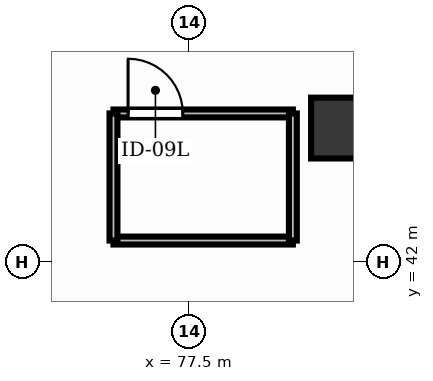
"""IFC4 building model, lengths in metres.
Left out: names, types, materials, properties, quantities, classifications, styles, units other than length and angle.
Written with IfcOpenShell. Run it as: python <this file> out.ifc"""

import sys

from ifc_helpers import new_model, si_unit, direction, frame, frame_2d, origin, origin_2d, place, context, subcontext, project, spatial, rectangle, extrude, element, fill, save


model = new_model("IFC4")
c1 = context("Model", 3, precision=1e-05, world=origin(), true_north=direction((0.0, 1.0)))
c2 = subcontext(c1, "Body", "Model", "MODEL_VIEW")
j1 = project(units=[si_unit("LENGTHUNIT", "METRE"), si_unit("PLANEANGLEUNIT", "RADIAN")], contexts=[c1])
p1 = place(None, origin())
s1 = spatial("IfcSite", under=j1, at=p1, CompositionType="ELEMENT")
p2 = place(p1, origin())
s2 = spatial("IfcBuilding", under=s1, at=p2, CompositionType="ELEMENT")
p3 = place(p2, frame((0.0, 0.0, 15.0)))
s3 = spatial("IfcBuildingStorey", under=s2, at=p3, CompositionType="ELEMENT", Elevation=15.0)
p4 = place(p3, frame((80.0, 44.2, 0.0), z_axis=(0.0, 0.0, 1.0), x_axis=(1.0, 0.0, 0.0)))
e1 = element("IfcColumn", 1, at=p4, inside=s3, PredefinedType="COLUMN", context=c2, shape_type="SweptSolid", body=[
    extrude(rectangle(XDim=1.0, YDim=1.0, at=origin_2d()), origin(), (0.0, 0.0, 1.0), 5.1),
])
p5 = place(p3, frame((76.25, 44.44, 0.0), z_axis=(0.0, 0.0, 1.0), x_axis=(1.0, 0.0, 0.0)))
e2 = element("IfcWall", 2, at=p5, inside=s3, PredefinedType="PARTITIONING", context=c2, shape_type="SweptSolid", body=[
    extrude(rectangle(XDim=2.95, YDim=0.13, at=frame_2d((1.475, 0.0))), origin(), (0.0, 0.0, 1.0), 3.36),
])
p6 = place(p5, frame((0.24, 0.0, 0.0)))
e3 = element("IfcOpeningElement", 3, at=p6, cuts=e2, PredefinedType="OPENING", context=c2, shape_type="SweptSolid", body=[
    extrude(rectangle(XDim=0.9, YDim=2.15, at=frame_2d((0.45, 1.075))), frame((0.0, 0.08, 0.0), z_axis=(0.0, -1.0, 0.0), x_axis=(1.0, 0.0, 0.0)), (0.0, 0.0, 1.0), 0.16),
])
p7 = place(p3, frame((79.2, 42.35, 0.0), z_axis=(0.0, 0.0, 1.0), x_axis=(-1.0, 0.0, 0.0)))
e4 = element("IfcWall", 4, at=p7, inside=s3, PredefinedType="PARTITIONING", context=c2, shape_type="SweptSolid", body=[
    extrude(rectangle(XDim=2.95, YDim=0.13, at=frame_2d((1.475, 0.0))), origin(), (0.0, 0.0, 1.0), 3.36),
])
for number, where, z_axis, x_axis in (
    (5, (76.25, 42.35, 0.0), (0.0, 0.0, 1.0), (0.0, 1.0, 0.0)),
    (6, (79.2, 44.44, 0.0), (0.0, 0.0, 1.0), (0.0, -1.0, 0.0)),
):
    element("IfcWall", number, at=place(p3, frame(where, z_axis=z_axis, x_axis=x_axis)), inside=s3, PredefinedType="PARTITIONING", context=c2, shape_type="SweptSolid", body=[
        extrude(rectangle(XDim=2.09, YDim=0.13, at=frame_2d((1.045, 0.0))), origin(), (0.0, 0.0, 1.0), 3.36),
    ])
p8 = place(p6, origin())
e7 = element("IfcDoor", 7, at=p8, inside=s3, OperationType="SINGLE_SWING_LEFT", PredefinedType="DOOR", context=c2, shape_type="SweptSolid", body=[
    extrude(rectangle(XDim=0.9, YDim=2.15, at=frame_2d((0.45, 1.075))), frame((0.0, 0.025, 0.0), z_axis=(0.0, -1.0, 0.0), x_axis=(1.0, 0.0, 0.0)), (0.0, 0.0, 1.0), 0.05),
])
fill(e3, e7)
save(model, sys.argv[1])
